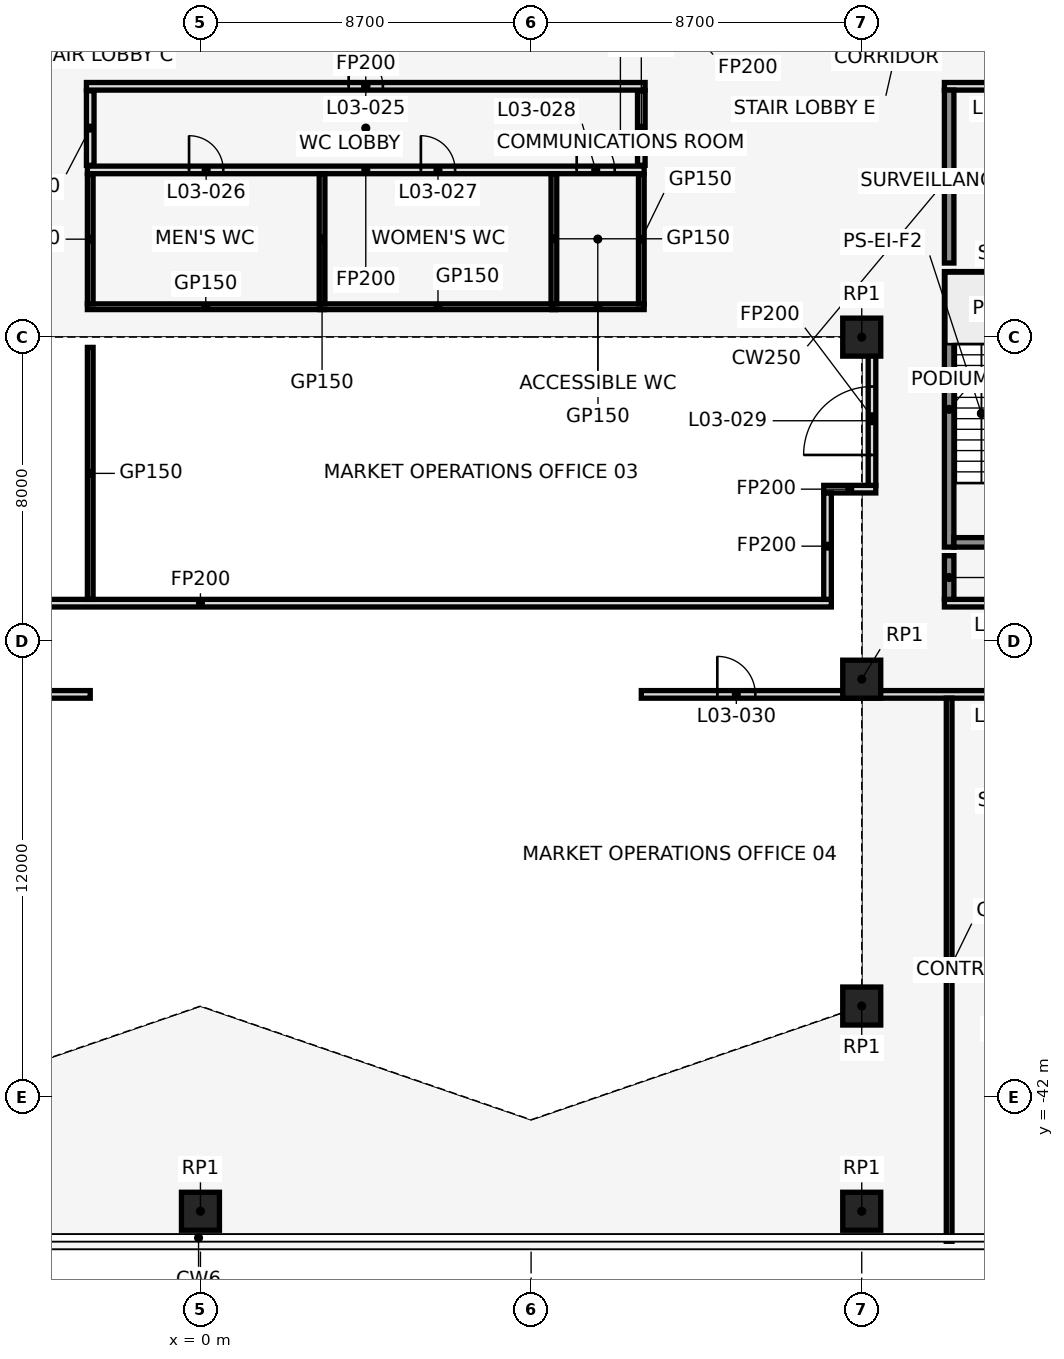
"""IFC4 building model, lengths in metres.
Left out: names, types, materials, properties, quantities, classifications, styles, units other than length and angle.
Written with IfcOpenShell. Run it as: python <this file> out.ifc"""

import sys

from ifc_helpers import new_model, si_unit, direction, frame, frame_2d, origin, origin_2d, place, context, subcontext, project, spatial, rectangle, extrude, element, fill, save


model = new_model("IFC4")
c1 = context("Model", 3, precision=1e-05, world=origin(), true_north=direction((0.0, 1.0)))
c2 = subcontext(c1, "Body", "Model", "MODEL_VIEW")
j1 = project(units=[si_unit("LENGTHUNIT", "METRE"), si_unit("PLANEANGLEUNIT", "RADIAN")], contexts=[c1])
p1 = place(None, origin())
s1 = spatial("IfcSite", under=j1, at=p1, CompositionType="ELEMENT")
p2 = place(p1, origin())
s2 = spatial("IfcBuilding", under=s1, at=p2, CompositionType="ELEMENT")
p3 = place(p2, frame((0.0, 0.0, 20.0)))
s3 = spatial("IfcBuildingStorey", under=s2, at=p3, CompositionType="ELEMENT", Elevation=20.0)
for number, where, z_axis, x_axis in (
    (1, (17.4, -39.6, 0.0), (0.0, 0.0, 1.0), (1.0, 0.0, 0.0)),
    (2, (17.4, -22.0, 0.0), (0.0, 0.0, 1.0), (1.0, 0.0, 0.0)),
    (3, (0.0, -45.0, 0.0), (0.0, 0.0, 1.0), (1.0, 0.0, 0.0)),
    (4, (17.4, -31.0, 0.0), (0.0, 0.0, 1.0), (1.0, 0.0, 0.0)),
    (5, (17.4, -45.0, 0.0), (0.0, 0.0, 1.0), (1.0, 0.0, 0.0)),
):
    element("IfcColumn", number, at=place(p3, frame(where, z_axis=z_axis, x_axis=x_axis)), inside=s3, PredefinedType="COLUMN", context=c2, shape_type="SweptSolid", body=[
        extrude(rectangle(XDim=1.0, YDim=1.0, at=origin_2d()), origin(), (0.0, 0.0, 1.0), 5.0),
    ])
p4 = place(p3, frame((19.7, -27.525, 0.0), z_axis=(0.0, 0.0, 1.0), x_axis=(0.0, 1.0, 0.0)))
e6 = element("IfcWall", 6, at=p4, inside=s3, PredefinedType="SHEAR", context=c2, shape_type="SweptSolid", body=[
    extrude(rectangle(XDim=7.25, YDim=0.25, at=frame_2d((3.625, 0.0))), origin(), (0.0, 0.0, 1.0), 5.0),
])
p5 = place(p3, frame((19.825, -27.4, 0.0), z_axis=(0.0, 0.0, 1.0), x_axis=(1.0, 0.0, 0.0)))
e7 = element("IfcWall", 7, at=p5, inside=s3, PredefinedType="SHEAR", context=c2, shape_type="SweptSolid", body=[
    extrude(rectangle(XDim=3.05, YDim=0.25, at=frame_2d((1.525, 0.0))), origin(), (0.0, 0.0, 1.0), 5.0),
])
p6 = place(p5, frame((1.1, 0.0, 0.0)))
e8 = element("IfcOpeningElement", 8, at=p6, cuts=e7, PredefinedType="OPENING", context=c2, shape_type="SweptSolid", body=[
    extrude(rectangle(XDim=0.9, YDim=2.1, at=frame_2d((0.45, 1.05))), frame((0.0, 0.137, 0.0), z_axis=(0.0, -1.0, 0.0), x_axis=(1.0, 0.0, 0.0)), (0.0, 0.0, 1.0), 0.274),
])
p7 = place(p3, frame((19.825, -20.4, 0.0), z_axis=(0.0, 0.0, 1.0), x_axis=(1.0, 0.0, 0.0)))
e9 = element("IfcWall", 9, at=p7, inside=s3, PredefinedType="SHEAR", context=c2, shape_type="SweptSolid", body=[
    extrude(rectangle(XDim=3.05, YDim=0.25, at=frame_2d((1.525, 0.0))), origin(), (0.0, 0.0, 1.0), 5.0),
])
p8 = place(p3, frame((-42.0, -31.4, 0.0), z_axis=(0.0, 0.0, 1.0), x_axis=(1.0, 0.0, 0.0)))
e10 = element("IfcWall", 10, at=p8, inside=s3, PredefinedType="PARTITIONING", context=c2, shape_type="SweptSolid", body=[
    extrude(rectangle(XDim=39.1, YDim=0.2, at=frame_2d((19.55, 0.0))), origin(), (0.0, 0.0, 1.0), 4.7),
])
p9 = place(p8, frame((1.5, 0.0, 0.0)))
e11 = element("IfcOpeningElement", 11, at=p9, cuts=e10, PredefinedType="OPENING", context=c2, shape_type="SweptSolid", body=[
    extrude(rectangle(XDim=1.0, YDim=2.1, at=frame_2d((0.5, 1.05))), frame((0.0, 0.112, 0.0), z_axis=(0.0, -1.0, 0.0), x_axis=(1.0, 0.0, 0.0)), (0.0, 0.0, 1.0), 0.224),
])
p10 = place(p8, frame((8.5, 0.0, 0.0)))
e12 = element("IfcOpeningElement", 12, at=p10, cuts=e10, PredefinedType="OPENING", context=c2, shape_type="SweptSolid", body=[
    extrude(rectangle(XDim=1.0, YDim=2.1, at=frame_2d((0.5, 1.05))), frame((0.0, 0.112, 0.0), z_axis=(0.0, -1.0, 0.0), x_axis=(1.0, 0.0, 0.0)), (0.0, 0.0, 1.0), 0.224),
])
p11 = place(p8, frame((17.2, 0.0, 0.0)))
e13 = element("IfcOpeningElement", 13, at=p11, cuts=e10, PredefinedType="OPENING", context=c2, shape_type="SweptSolid", body=[
    extrude(rectangle(XDim=1.0, YDim=2.1, at=frame_2d((0.5, 1.05))), frame((0.0, 0.112, 0.0), z_axis=(0.0, -1.0, 0.0), x_axis=(1.0, 0.0, 0.0)), (0.0, 0.0, 1.0), 0.224),
])
p12 = place(p8, frame((20.1, 0.0, 0.0)))
e14 = element("IfcOpeningElement", 14, at=p12, cuts=e10, PredefinedType="OPENING", context=c2, shape_type="SweptSolid", body=[
    extrude(rectangle(XDim=1.0, YDim=2.1, at=frame_2d((0.5, 1.05))), frame((0.0, 0.112, 0.0), z_axis=(0.0, -1.0, 0.0), x_axis=(1.0, 0.0, 0.0)), (0.0, 0.0, 1.0), 0.224),
])
p13 = place(p8, frame((31.4, 0.0, 0.0)))
e15 = element("IfcOpeningElement", 15, at=p13, cuts=e10, PredefinedType="OPENING", context=c2, shape_type="SweptSolid", body=[
    extrude(rectangle(XDim=1.8, YDim=2.1, at=frame_2d((0.9, 1.05))), frame((0.0, 0.112, 0.0), z_axis=(0.0, -1.0, 0.0), x_axis=(1.0, 0.0, 0.0)), (0.0, 0.0, 1.0), 0.224),
])
p14 = place(p3, frame((11.6, -31.4, 0.0), z_axis=(0.0, 0.0, 1.0), x_axis=(1.0, 0.0, 0.0)))
e16 = element("IfcWall", 16, at=p14, inside=s3, PredefinedType="PARTITIONING", context=c2, shape_type="SweptSolid", body=[
    extrude(rectangle(XDim=30.4, YDim=0.2, at=frame_2d((15.2, 0.0))), origin(), (0.0, 0.0, 1.0), 4.7),
])
p15 = place(p14, frame((2.0, 0.0, 0.0)))
e17 = element("IfcOpeningElement", 17, at=p15, cuts=e16, PredefinedType="OPENING", context=c2, shape_type="SweptSolid", body=[
    extrude(rectangle(XDim=1.0, YDim=2.1, at=frame_2d((0.5, 1.05))), frame((0.0, 0.112, 0.0), z_axis=(0.0, -1.0, 0.0), x_axis=(1.0, 0.0, 0.0)), (0.0, 0.0, 1.0), 0.224),
])
p16 = place(p14, frame((9.3, 0.0, 0.0)))
e18 = element("IfcOpeningElement", 18, at=p16, cuts=e16, PredefinedType="OPENING", context=c2, shape_type="SweptSolid", body=[
    extrude(rectangle(XDim=1.0, YDim=2.1, at=frame_2d((0.5, 1.05))), frame((0.0, 0.112, 0.0), z_axis=(0.0, -1.0, 0.0), x_axis=(1.0, 0.0, 0.0)), (0.0, 0.0, 1.0), 0.224),
])
p17 = place(p14, frame((12.2, 0.0, 0.0)))
e19 = element("IfcOpeningElement", 19, at=p17, cuts=e16, PredefinedType="OPENING", context=c2, shape_type="SweptSolid", body=[
    extrude(rectangle(XDim=1.0, YDim=2.1, at=frame_2d((0.5, 1.05))), frame((0.0, 0.112, 0.0), z_axis=(0.0, -1.0, 0.0), x_axis=(1.0, 0.0, 0.0)), (0.0, 0.0, 1.0), 0.224),
])
p18 = place(p14, frame((20.9, 0.0, 0.0)))
e20 = element("IfcOpeningElement", 20, at=p18, cuts=e16, PredefinedType="OPENING", context=c2, shape_type="SweptSolid", body=[
    extrude(rectangle(XDim=1.0, YDim=2.1, at=frame_2d((0.5, 1.05))), frame((0.0, 0.112, 0.0), z_axis=(0.0, -1.0, 0.0), x_axis=(1.0, 0.0, 0.0)), (0.0, 0.0, 1.0), 0.224),
])
p19 = place(p14, frame((27.9, 0.0, 0.0)))
e21 = element("IfcOpeningElement", 21, at=p19, cuts=e16, PredefinedType="OPENING", context=c2, shape_type="SweptSolid", body=[
    extrude(rectangle(XDim=1.0, YDim=2.1, at=frame_2d((0.5, 1.05))), frame((0.0, 0.112, 0.0), z_axis=(0.0, -1.0, 0.0), x_axis=(1.0, 0.0, 0.0)), (0.0, 0.0, 1.0), 0.224),
])
p20 = place(p3, frame((-16.6, -29.0, 0.0), z_axis=(0.0, 0.0, 1.0), x_axis=(1.0, 0.0, 0.0)))
e22 = element("IfcWall", 22, at=p20, inside=s3, PredefinedType="PARTITIONING", context=c2, shape_type="SweptSolid", body=[
    extrude(rectangle(XDim=33.2, YDim=0.2, at=frame_2d((16.6, 0.0))), origin(), (0.0, 0.0, 1.0), 4.7),
])
p21 = place(p3, frame((19.575, -29.0, 0.0), z_axis=(0.0, 0.0, 1.0), x_axis=(1.0, 0.0, 0.0)))
e23 = element("IfcWall", 23, at=p21, inside=s3, PredefinedType="PARTITIONING", context=c2, shape_type="SweptSolid", body=[
    extrude(rectangle(XDim=22.425, YDim=0.2, at=frame_2d((11.212, 0.0))), origin(), (0.0, 0.0, 1.0), 4.7),
])
p22 = place(p21, frame((1.225, 0.0, 0.0)))
e24 = element("IfcOpeningElement", 24, at=p22, cuts=e23, PredefinedType="OPENING", context=c2, shape_type="SweptSolid", body=[
    extrude(rectangle(XDim=1.2, YDim=2.1, at=frame_2d((0.6, 1.05))), frame((0.0, 0.112, 0.0), z_axis=(0.0, -1.0, 0.0), x_axis=(1.0, 0.0, 0.0)), (0.0, 0.0, 1.0), 0.224),
])
p23 = place(p21, frame((19.425, 0.0, 0.0)))
e25 = element("IfcOpeningElement", 25, at=p23, cuts=e23, PredefinedType="OPENING", context=c2, shape_type="SweptSolid", body=[
    extrude(rectangle(XDim=1.2, YDim=2.1, at=frame_2d((0.6, 1.05))), frame((0.0, 0.112, 0.0), z_axis=(0.0, -1.0, 0.0), x_axis=(1.0, 0.0, 0.0)), (0.0, 0.0, 1.0), 0.224),
])
p24 = place(p3, frame((16.4, -26.0, 0.0), z_axis=(0.0, 0.0, 1.0), x_axis=(1.0, 0.0, 0.0)))
e26 = element("IfcWall", 26, at=p24, inside=s3, PredefinedType="PARTITIONING", context=c2, shape_type="SweptSolid", body=[
    extrude(rectangle(XDim=1.37, YDim=0.2, at=frame_2d((0.685, 0.0))), origin(), (0.0, 0.0, 1.0), 4.7),
])
p25 = place(p3, frame((-2.975, -21.2, 0.0), z_axis=(0.0, 0.0, 1.0), x_axis=(1.0, 0.0, 0.0)))
e27 = element("IfcWall", 27, at=p25, inside=s3, PredefinedType="PARTITIONING", context=c2, shape_type="SweptSolid", body=[
    extrude(rectangle(XDim=6.23, YDim=0.15, at=frame_2d((3.115, 0.0))), origin(), (0.0, 0.0, 1.0), 4.7),
])
p26 = place(p3, frame((3.145, -21.2, 0.0), z_axis=(0.0, 0.0, 1.0), x_axis=(1.0, 0.0, 0.0)))
e28 = element("IfcWall", 28, at=p26, inside=s3, PredefinedType="PARTITIONING", context=c2, shape_type="SweptSolid", body=[
    extrude(rectangle(XDim=6.21, YDim=0.15, at=frame_2d((3.105, 0.0))), origin(), (0.0, 0.0, 1.0), 4.7),
])
p27 = place(p3, frame((9.245, -21.2, 0.0), z_axis=(0.0, 0.0, 1.0), x_axis=(1.0, 0.0, 0.0)))
e29 = element("IfcWall", 29, at=p27, inside=s3, PredefinedType="PARTITIONING", context=c2, shape_type="SweptSolid", body=[
    extrude(rectangle(XDim=2.43, YDim=0.15, at=frame_2d((1.215, 0.0))), origin(), (0.0, 0.0, 1.0), 4.7),
])
p28 = place(p3, frame((-2.975, -17.6, 0.0), z_axis=(0.0, 0.0, 1.0), x_axis=(1.0, 0.0, 0.0)))
e30 = element("IfcWall", 30, at=p28, inside=s3, PredefinedType="PARTITIONING", context=c2, shape_type="SweptSolid", body=[
    extrude(rectangle(XDim=14.65, YDim=0.2, at=frame_2d((7.325, 0.0))), origin(), (0.0, 0.0, 1.0), 4.7),
])
p29 = place(p28, frame((2.675, 0.0, 0.0)))
e31 = element("IfcOpeningElement", 31, at=p29, cuts=e30, PredefinedType="OPENING", context=c2, shape_type="SweptSolid", body=[
    extrude(rectangle(XDim=0.9, YDim=2.1, at=frame_2d((0.45, 1.05))), frame((0.0, 0.112, 0.0), z_axis=(0.0, -1.0, 0.0), x_axis=(1.0, 0.0, 0.0)), (0.0, 0.0, 1.0), 0.224),
])
p30 = place(p28, frame((8.775, 0.0, 0.0)))
e32 = element("IfcOpeningElement", 32, at=p30, cuts=e30, PredefinedType="OPENING", context=c2, shape_type="SweptSolid", body=[
    extrude(rectangle(XDim=0.9, YDim=2.1, at=frame_2d((0.45, 1.05))), frame((0.0, 0.112, 0.0), z_axis=(0.0, -1.0, 0.0), x_axis=(1.0, 0.0, 0.0)), (0.0, 0.0, 1.0), 0.224),
])
p31 = place(p28, frame((12.875, 0.0, 0.0)))
e33 = element("IfcOpeningElement", 33, at=p31, cuts=e30, PredefinedType="OPENING", context=c2, shape_type="SweptSolid", body=[
    extrude(rectangle(XDim=1.0, YDim=2.1, at=frame_2d((0.5, 1.05))), frame((0.0, 0.112, 0.0), z_axis=(0.0, -1.0, 0.0), x_axis=(1.0, 0.0, 0.0)), (0.0, 0.0, 1.0), 0.224),
])
p32 = place(p3, frame((-3.0, -15.4, 0.0), z_axis=(0.0, 0.0, 1.0), x_axis=(1.0, 0.0, 0.0)))
e34 = element("IfcWall", 34, at=p32, inside=s3, PredefinedType="PARTITIONING", context=c2, shape_type="SweptSolid", body=[
    extrude(rectangle(XDim=14.7, YDim=0.2, at=frame_2d((7.35, 0.0))), origin(), (0.0, 0.0, 1.0), 4.7),
])
p33 = place(p32, frame((6.9, 0.0, 0.0)))
e35 = element("IfcOpeningElement", 35, at=p33, cuts=e34, PredefinedType="OPENING", context=c2, shape_type="SweptSolid", body=[
    extrude(rectangle(XDim=0.9, YDim=2.1, at=frame_2d((0.45, 1.05))), frame((0.0, 0.112, 0.0), z_axis=(0.0, -1.0, 0.0), x_axis=(1.0, 0.0, 0.0)), (0.0, 0.0, 1.0), 0.224),
])
p34 = place(p3, frame((19.575, -15.4, 0.0), z_axis=(0.0, 0.0, 1.0), x_axis=(1.0, 0.0, 0.0)))
e36 = element("IfcWall", 36, at=p34, inside=s3, PredefinedType="PARTITIONING", context=c2, shape_type="SweptSolid", body=[
    extrude(rectangle(XDim=22.425, YDim=0.2, at=frame_2d((11.212, 0.0))), origin(), (0.0, 0.0, 1.0), 4.7),
])
p35 = place(p34, frame((1.325, 0.0, 0.0)))
e37 = element("IfcOpeningElement", 37, at=p35, cuts=e36, PredefinedType="OPENING", context=c2, shape_type="SweptSolid", body=[
    extrude(rectangle(XDim=0.9, YDim=2.1, at=frame_2d((0.45, 1.05))), frame((0.0, 0.112, 0.0), z_axis=(0.0, -1.0, 0.0), x_axis=(1.0, 0.0, 0.0)), (0.0, 0.0, 1.0), 0.224),
])
p36 = place(p34, frame((5.925, 0.0, 0.0)))
e38 = element("IfcOpeningElement", 38, at=p36, cuts=e36, PredefinedType="OPENING", context=c2, shape_type="SweptSolid", body=[
    extrude(rectangle(XDim=1.0, YDim=2.1, at=frame_2d((0.5, 1.05))), frame((0.0, 0.112, 0.0), z_axis=(0.0, -1.0, 0.0), x_axis=(1.0, 0.0, 0.0)), (0.0, 0.0, 1.0), 0.224),
])
p37 = place(p34, frame((11.025, 0.0, 0.0)))
e39 = element("IfcOpeningElement", 39, at=p37, cuts=e36, PredefinedType="OPENING", context=c2, shape_type="SweptSolid", body=[
    extrude(rectangle(XDim=1.8, YDim=2.1, at=frame_2d((0.9, 1.05))), frame((0.0, 0.112, 0.0), z_axis=(0.0, -1.0, 0.0), x_axis=(1.0, 0.0, 0.0)), (0.0, 0.0, 1.0), 0.224),
])
p38 = place(p34, frame((19.925, 0.0, 0.0)))
e40 = element("IfcOpeningElement", 40, at=p38, cuts=e36, PredefinedType="OPENING", context=c2, shape_type="SweptSolid", body=[
    extrude(rectangle(XDim=0.9, YDim=2.1, at=frame_2d((0.45, 1.05))), frame((0.0, 0.112, 0.0), z_axis=(0.0, -1.0, 0.0), x_axis=(1.0, 0.0, 0.0)), (0.0, 0.0, 1.0), 0.224),
])
p39 = place(p3, frame((-2.9, -28.9, 0.0), z_axis=(0.0, 0.0, 1.0), x_axis=(0.0, 1.0, 0.0)))
e41 = element("IfcWall", 41, at=p39, inside=s3, PredefinedType="PARTITIONING", context=c2, shape_type="SweptSolid", body=[
    extrude(rectangle(XDim=6.63, YDim=0.15, at=frame_2d((3.315, 0.0))), origin(), (0.0, 0.0, 1.0), 4.7),
])
p40 = place(p3, frame((-2.9, -21.125, 0.0), z_axis=(0.0, 0.0, 1.0), x_axis=(0.0, 1.0, 0.0)))
e42 = element("IfcWall", 42, at=p40, inside=s3, PredefinedType="PARTITIONING", context=c2, shape_type="SweptSolid", body=[
    extrude(rectangle(XDim=3.405, YDim=0.15, at=frame_2d((1.703, 0.0))), origin(), (0.0, 0.0, 1.0), 4.7),
])
p41 = place(p3, frame((-2.9, -17.48, 0.0), z_axis=(0.0, 0.0, 1.0), x_axis=(0.0, 1.0, 0.0)))
e43 = element("IfcWall", 43, at=p41, inside=s3, PredefinedType="PARTITIONING", context=c2, shape_type="SweptSolid", body=[
    extrude(rectangle(XDim=1.96, YDim=0.2, at=frame_2d((0.98, 0.0))), origin(), (0.0, 0.0, 1.0), 4.7),
])
for number, where, z_axis, x_axis in (
    (44, (3.2, -21.125, 0.0), (0.0, 0.0, 1.0), (0.0, 1.0, 0.0)),
    (45, (9.3, -21.125, 0.0), (0.0, 0.0, 1.0), (0.0, 1.0, 0.0)),
):
    element("IfcWall", number, at=place(p3, frame(where, z_axis=z_axis, x_axis=x_axis)), inside=s3, PredefinedType="PARTITIONING", context=c2, shape_type="SweptSolid", body=[
        extrude(rectangle(XDim=3.425, YDim=0.15, at=frame_2d((1.712, 0.0))), origin(), (0.0, 0.0, 1.0), 4.7),
    ])
p42 = place(p3, frame((11.6, -21.125, 0.0), z_axis=(0.0, 0.0, 1.0), x_axis=(0.0, 1.0, 0.0)))
e46 = element("IfcWall", 46, at=p42, inside=s3, PredefinedType="PARTITIONING", context=c2, shape_type="SweptSolid", body=[
    extrude(rectangle(XDim=3.405, YDim=0.15, at=frame_2d((1.703, 0.0))), origin(), (0.0, 0.0, 1.0), 4.7),
])
p43 = place(p3, frame((11.6, -17.48, 0.0), z_axis=(0.0, 0.0, 1.0), x_axis=(0.0, 1.0, 0.0)))
e47 = element("IfcWall", 47, at=p43, inside=s3, PredefinedType="PARTITIONING", context=c2, shape_type="SweptSolid", body=[
    extrude(rectangle(XDim=1.96, YDim=0.2, at=frame_2d((0.98, 0.0))), origin(), (0.0, 0.0, 1.0), 4.7),
])
p44 = place(p3, frame((16.5, -28.9, 0.0), z_axis=(0.0, 0.0, 1.0), x_axis=(0.0, 1.0, 0.0)))
e48 = element("IfcWall", 48, at=p44, inside=s3, PredefinedType="PARTITIONING", context=c2, shape_type="SweptSolid", body=[
    extrude(rectangle(XDim=2.8, YDim=0.2, at=frame_2d((1.4, 0.0))), origin(), (0.0, 0.0, 1.0), 4.7),
])
p45 = place(p3, frame((17.67, -25.9, 0.0), z_axis=(0.0, 0.0, 1.0), x_axis=(0.0, 1.0, 0.0)))
e49 = element("IfcWall", 49, at=p45, inside=s3, PredefinedType="PARTITIONING", context=c2, shape_type="SweptSolid", body=[
    extrude(rectangle(XDim=3.61, YDim=0.2, at=frame_2d((1.805, 0.0))), origin(), (0.0, 0.0, 1.0), 4.7),
])
p46 = place(p45, frame((0.8, 0.0, 0.0)))
e50 = element("IfcOpeningElement", 50, at=p46, cuts=e49, PredefinedType="OPENING", context=c2, shape_type="SweptSolid", body=[
    extrude(rectangle(XDim=1.8, YDim=2.1, at=frame_2d((0.9, 1.05))), frame((0.0, 0.112, 0.0), z_axis=(0.0, -1.0, 0.0), x_axis=(1.0, 0.0, 0.0)), (0.0, 0.0, 1.0), 0.224),
])
p47 = place(p3, frame((19.7, -45.79, 0.0), z_axis=(0.0, 0.0, 1.0), x_axis=(0.0, 1.0, 0.0)))
e51 = element("IfcWall", 51, at=p47, inside=s3, PredefinedType="PARTITIONING", context=c2, shape_type="SweptSolid", body=[
    extrude(rectangle(XDim=14.29, YDim=0.15, at=frame_2d((7.145, 0.0))), origin(), (0.0, 0.0, 1.0), 4.7),
])
p48 = place(p3, frame((19.7, -28.9, 0.0), z_axis=(0.0, 0.0, 1.0), x_axis=(0.0, 1.0, 0.0)))
e52 = element("IfcWall", 52, at=p48, inside=s3, PredefinedType="SHEAR", context=c2, shape_type="SweptSolid", body=[
    extrude(rectangle(XDim=1.15, YDim=0.25, at=frame_2d((0.575, 0.0))), origin(), (0.0, 0.0, 1.0), 5.0),
])
p49 = place(p3, frame((19.7, -20.05, 0.0), z_axis=(0.0, 0.0, 1.0), x_axis=(0.0, 1.0, 0.0)))
e53 = element("IfcWall", 53, at=p49, inside=s3, PredefinedType="SHEAR", context=c2, shape_type="SweptSolid", body=[
    extrude(rectangle(XDim=4.55, YDim=0.25, at=frame_2d((2.275, 0.0))), origin(), (0.0, 0.0, 1.0), 5.0),
])
p50 = place(p33, frame((0.9, 0.0, 0.0), z_axis=(0.0, 0.0, 1.0), x_axis=(-1.0, 0.0, 0.0)))
e54 = element("IfcDoor", 54, at=p50, inside=s3, OperationType="SINGLE_SWING_LEFT", PredefinedType="DOOR", context=c2, shape_type="SweptSolid", body=[
    extrude(rectangle(XDim=0.9, YDim=2.1, at=frame_2d((0.45, 1.05))), frame((0.0, 0.025, 0.0), z_axis=(0.0, -1.0, 0.0), x_axis=(1.0, 0.0, 0.0)), (0.0, 0.0, 1.0), 0.05),
])
fill(e35, e54)
p51 = place(p29, frame((0.9, 0.0, 0.0), z_axis=(0.0, 0.0, 1.0), x_axis=(-1.0, 0.0, 0.0)))
e55 = element("IfcDoor", 55, at=p51, inside=s3, OperationType="SINGLE_SWING_RIGHT", PredefinedType="DOOR", context=c2, shape_type="SweptSolid", body=[
    extrude(rectangle(XDim=0.9, YDim=2.1, at=frame_2d((0.45, 1.05))), frame((0.0, 0.025, 0.0), z_axis=(0.0, -1.0, 0.0), x_axis=(1.0, 0.0, 0.0)), (0.0, 0.0, 1.0), 0.05),
])
fill(e31, e55)
p52 = place(p30, frame((0.9, 0.0, 0.0), z_axis=(0.0, 0.0, 1.0), x_axis=(-1.0, 0.0, 0.0)))
e56 = element("IfcDoor", 56, at=p52, inside=s3, OperationType="SINGLE_SWING_RIGHT", PredefinedType="DOOR", context=c2, shape_type="SweptSolid", body=[
    extrude(rectangle(XDim=0.9, YDim=2.1, at=frame_2d((0.45, 1.05))), frame((0.0, 0.025, 0.0), z_axis=(0.0, -1.0, 0.0), x_axis=(1.0, 0.0, 0.0)), (0.0, 0.0, 1.0), 0.05),
])
fill(e32, e56)
p53 = place(p31, frame((1.0, 0.0, 0.0), z_axis=(0.0, 0.0, 1.0), x_axis=(-1.0, 0.0, 0.0)))
e57 = element("IfcDoor", 57, at=p53, inside=s3, OperationType="SINGLE_SWING_LEFT", PredefinedType="DOOR", context=c2, shape_type="SweptSolid", body=[
    extrude(rectangle(XDim=1.0, YDim=2.1, at=frame_2d((0.5, 1.05))), frame((0.0, 0.025, 0.0), z_axis=(0.0, -1.0, 0.0), x_axis=(1.0, 0.0, 0.0)), (0.0, 0.0, 1.0), 0.05),
])
fill(e33, e57)
p54 = place(p46, origin())
e58 = element("IfcDoor", 58, at=p54, inside=s3, OperationType="SINGLE_SWING_LEFT", PredefinedType="DOOR", context=c2, shape_type="SweptSolid", body=[
    extrude(rectangle(XDim=1.8, YDim=2.1, at=frame_2d((0.9, 1.05))), frame((0.0, 0.025, 0.0), z_axis=(0.0, -1.0, 0.0), x_axis=(1.0, 0.0, 0.0)), (0.0, 0.0, 1.0), 0.05),
])
fill(e50, e58)
p55 = place(p15, frame((1.0, 0.0, 0.0), z_axis=(0.0, 0.0, 1.0), x_axis=(-1.0, 0.0, 0.0)))
e59 = element("IfcDoor", 59, at=p55, inside=s3, OperationType="SINGLE_SWING_RIGHT", PredefinedType="DOOR", context=c2, shape_type="SweptSolid", body=[
    extrude(rectangle(XDim=1.0, YDim=2.1, at=frame_2d((0.5, 1.05))), frame((0.0, 0.025, 0.0), z_axis=(0.0, -1.0, 0.0), x_axis=(1.0, 0.0, 0.0)), (0.0, 0.0, 1.0), 0.05),
])
fill(e17, e59)
save(model, sys.argv[1])
